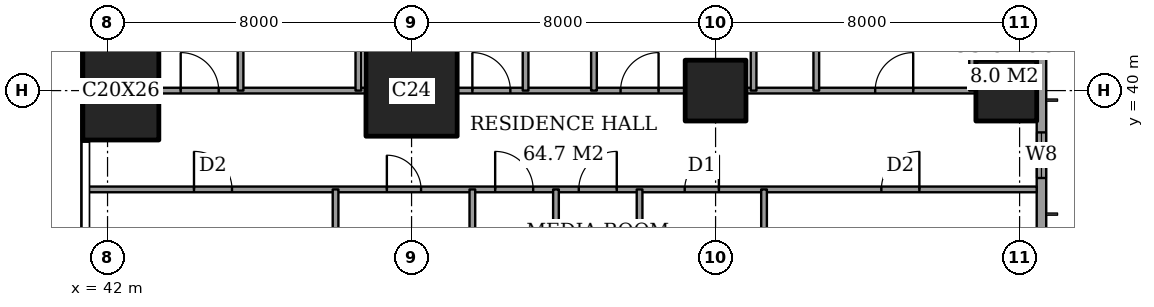
"""IFC4 building model, lengths in metres.
Left out: names, types, materials, properties, quantities, classifications, styles, units other than length and angle.
Written with IfcOpenShell. Run it as: python <this file> out.ifc"""

import sys

from ifc_helpers import new_model, si_unit, direction, frame, frame_2d, origin, origin_2d, place, context, subcontext, project, spatial, rectangle, extrude, element, fill, save


model = new_model("IFC4")
c1 = context("Model", 3, precision=1e-05, world=origin(), true_north=direction((0.0, 1.0)))
c2 = subcontext(c1, "Body", "Model", "MODEL_VIEW")
j1 = project(units=[si_unit("LENGTHUNIT", "METRE"), si_unit("PLANEANGLEUNIT", "RADIAN")], contexts=[c1])
p1 = place(None, origin())
s1 = spatial("IfcSite", under=j1, at=p1, CompositionType="ELEMENT")
p2 = place(p1, origin())
s2 = spatial("IfcBuilding", under=s1, at=p2, CompositionType="ELEMENT")
p3 = place(p2, frame((0.0, 0.0, 237.6)))
s3 = spatial("IfcBuildingStorey", under=s2, at=p3, CompositionType="ELEMENT", Elevation=237.6)
p4 = place(p3, frame((42.35, 40.0, 0.0), z_axis=(0.0, 0.0, 1.0), x_axis=(1.0, 0.0, 0.0)))
e1 = element("IfcColumn", 1, at=p4, inside=s3, PredefinedType="COLUMN", context=c2, shape_type="SweptSolid", body=[
    extrude(rectangle(XDim=2.0, YDim=2.6, at=origin_2d()), origin(), (0.0, 0.0, 1.0), 3.6),
])
p5 = place(p3, frame((50.0, 40.0, 0.0), z_axis=(0.0, 0.0, 1.0), x_axis=(1.0, 0.0, 0.0)))
e2 = element("IfcColumn", 2, at=p5, inside=s3, PredefinedType="COLUMN", context=c2, shape_type="SweptSolid", body=[
    extrude(rectangle(XDim=2.4, YDim=2.4, at=origin_2d()), origin(), (0.0, 0.0, 1.0), 3.6),
])
for number, where, z_axis, x_axis in (
    (3, (58.0, 40.0, 0.0), (0.0, 0.0, 1.0), (1.0, 0.0, 0.0)),
    (4, (65.65, 40.0, 0.0), (0.0, 0.0, 1.0), (1.0, 0.0, 0.0)),
):
    element("IfcColumn", number, at=place(p3, frame(where, z_axis=z_axis, x_axis=x_axis)), inside=s3, PredefinedType="COLUMN", context=c2, shape_type="SweptSolid", body=[
        extrude(rectangle(XDim=1.6, YDim=1.6, at=origin_2d()), origin(), (0.0, 0.0, 1.0), 3.6),
    ])
p6 = place(p3, frame((66.575, 3.175, 0.0), z_axis=(0.0, 0.0, 1.0), x_axis=(0.0, 1.0, 0.0)))
e5 = element("IfcWall", 5, at=p6, inside=s3, PredefinedType="SOLIDWALL", context=c2, shape_type="SweptSolid", body=[
    extrude(rectangle(XDim=41.65, YDim=0.25, at=frame_2d((20.825, 0.0))), origin(), (0.0, 0.0, 1.0), 3.6),
])
p7 = place(p6, frame((0.875, 0.0, 0.6)))
e6 = element("IfcOpeningElement", 6, at=p7, cuts=e5, PredefinedType="OPENING", context=c2, shape_type="SweptSolid", body=[
    extrude(rectangle(XDim=2.4, YDim=2.0, at=frame_2d((1.2, 1.0))), frame((0.0, 0.135, 0.0), z_axis=(0.0, -1.0, 0.0), x_axis=(1.0, 0.0, 0.0)), (0.0, 0.0, 1.0), 0.27),
])
p8 = place(p6, frame((6.225, 0.0, 0.6)))
e7 = element("IfcOpeningElement", 7, at=p8, cuts=e5, PredefinedType="OPENING", context=c2, shape_type="SweptSolid", body=[
    extrude(rectangle(XDim=1.2, YDim=2.0, at=frame_2d((0.6, 1.0))), frame((0.0, 0.135, 0.0), z_axis=(0.0, -1.0, 0.0), x_axis=(1.0, 0.0, 0.0)), (0.0, 0.0, 1.0), 0.27),
])
p9 = place(p6, frame((8.725, 0.0, 0.6)))
e8 = element("IfcOpeningElement", 8, at=p9, cuts=e5, PredefinedType="OPENING", context=c2, shape_type="SweptSolid", body=[
    extrude(rectangle(XDim=2.4, YDim=2.0, at=frame_2d((1.2, 1.0))), frame((0.0, 0.135, 0.0), z_axis=(0.0, -1.0, 0.0), x_axis=(1.0, 0.0, 0.0)), (0.0, 0.0, 1.0), 0.27),
])
p10 = place(p6, frame((15.725, 0.0, 0.6)))
e9 = element("IfcOpeningElement", 9, at=p10, cuts=e5, PredefinedType="OPENING", context=c2, shape_type="SweptSolid", body=[
    extrude(rectangle(XDim=2.4, YDim=2.0, at=frame_2d((1.2, 1.0))), frame((0.0, 0.135, 0.0), z_axis=(0.0, -1.0, 0.0), x_axis=(1.0, 0.0, 0.0)), (0.0, 0.0, 1.0), 0.27),
])
p11 = place(p6, frame((23.525, 0.0, 0.6)))
e10 = element("IfcOpeningElement", 10, at=p11, cuts=e5, PredefinedType="OPENING", context=c2, shape_type="SweptSolid", body=[
    extrude(rectangle(XDim=2.4, YDim=2.0, at=frame_2d((1.2, 1.0))), frame((0.0, 0.135, 0.0), z_axis=(0.0, -1.0, 0.0), x_axis=(1.0, 0.0, 0.0)), (0.0, 0.0, 1.0), 0.27),
])
p12 = place(p6, frame((30.725, 0.0, 0.6)))
e11 = element("IfcOpeningElement", 11, at=p12, cuts=e5, PredefinedType="OPENING", context=c2, shape_type="SweptSolid", body=[
    extrude(rectangle(XDim=2.4, YDim=2.0, at=frame_2d((1.2, 1.0))), frame((0.0, 0.135, 0.0), z_axis=(0.0, -1.0, 0.0), x_axis=(1.0, 0.0, 0.0)), (0.0, 0.0, 1.0), 0.27),
])
p13 = place(p6, frame((34.525, 0.0, 0.6)))
e12 = element("IfcOpeningElement", 12, at=p13, cuts=e5, PredefinedType="OPENING", context=c2, shape_type="SweptSolid", body=[
    extrude(rectangle(XDim=1.2, YDim=2.0, at=frame_2d((0.6, 1.0))), frame((0.0, 0.135, 0.0), z_axis=(0.0, -1.0, 0.0), x_axis=(1.0, 0.0, 0.0)), (0.0, 0.0, 1.0), 0.27),
])
p14 = place(p6, frame((38.375, 0.0, 0.6)))
e13 = element("IfcOpeningElement", 13, at=p14, cuts=e5, PredefinedType="OPENING", context=c2, shape_type="SweptSolid", body=[
    extrude(rectangle(XDim=2.4, YDim=2.0, at=frame_2d((1.2, 1.0))), frame((0.0, 0.135, 0.0), z_axis=(0.0, -1.0, 0.0), x_axis=(1.0, 0.0, 0.0)), (0.0, 0.0, 1.0), 0.27),
])
p15 = place(p3, frame((41.439, 37.4, 0.0), z_axis=(0.0, 0.0, 1.0), x_axis=(1.0, 0.0, 0.0)))
e14 = element("IfcWall", 14, at=p15, inside=s3, PredefinedType="PARTITIONING", context=c2, shape_type="SweptSolid", body=[
    extrude(rectangle(XDim=25.011, YDim=0.15, at=frame_2d((12.505, 0.0))), origin(), (0.0, 0.0, 1.0), 3.35),
])
p16 = place(p15, frame((10.761, 0.0, 0.0)))
e15 = element("IfcOpeningElement", 15, at=p16, cuts=e14, PredefinedType="OPENING", context=c2, shape_type="SweptSolid", body=[
    extrude(rectangle(XDim=1.0, YDim=2.1, at=frame_2d((0.5, 1.05))), frame((0.0, 0.085, 0.0), z_axis=(0.0, -1.0, 0.0), x_axis=(1.0, 0.0, 0.0)), (0.0, 0.0, 1.0), 0.17),
])
p17 = place(p15, frame((20.924, 0.0, 0.0)))
e16 = element("IfcOpeningElement", 16, at=p17, cuts=e14, PredefinedType="OPENING", context=c2, shape_type="SweptSolid", body=[
    extrude(rectangle(XDim=1.0, YDim=2.1, at=frame_2d((0.5, 1.05))), frame((0.0, 0.085, 0.0), z_axis=(0.0, -1.0, 0.0), x_axis=(1.0, 0.0, 0.0)), (0.0, 0.0, 1.0), 0.17),
])
p18 = place(p15, frame((15.749, 0.0, 0.0)))
e17 = element("IfcOpeningElement", 17, at=p18, cuts=e14, PredefinedType="OPENING", context=c2, shape_type="SweptSolid", body=[
    extrude(rectangle(XDim=0.9, YDim=2.1, at=frame_2d((0.45, 1.05))), frame((0.0, 0.085, 0.0), z_axis=(0.0, -1.0, 0.0), x_axis=(1.0, 0.0, 0.0)), (0.0, 0.0, 1.0), 0.17),
])
p19 = place(p15, frame((12.961, 0.0, 0.0)))
e18 = element("IfcOpeningElement", 18, at=p19, cuts=e14, PredefinedType="OPENING", context=c2, shape_type="SweptSolid", body=[
    extrude(rectangle(XDim=1.0, YDim=2.1, at=frame_2d((0.5, 1.05))), frame((0.0, 0.085, 0.0), z_axis=(0.0, -1.0, 0.0), x_axis=(1.0, 0.0, 0.0)), (0.0, 0.0, 1.0), 0.17),
])
p20 = place(p15, frame((7.911, 0.0, 0.0)))
e19 = element("IfcOpeningElement", 19, at=p20, cuts=e14, PredefinedType="OPENING", context=c2, shape_type="SweptSolid", body=[
    extrude(rectangle(XDim=0.9, YDim=2.1, at=frame_2d((0.45, 1.05))), frame((0.0, 0.085, 0.0), z_axis=(0.0, -1.0, 0.0), x_axis=(1.0, 0.0, 0.0)), (0.0, 0.0, 1.0), 0.17),
])
p21 = place(p15, frame((2.836, 0.0, 0.0)))
e20 = element("IfcOpeningElement", 20, at=p21, cuts=e14, PredefinedType="OPENING", context=c2, shape_type="SweptSolid", body=[
    extrude(rectangle(XDim=1.0, YDim=2.1, at=frame_2d((0.5, 1.05))), frame((0.0, 0.085, 0.0), z_axis=(0.0, -1.0, 0.0), x_axis=(1.0, 0.0, 0.0)), (0.0, 0.0, 1.0), 0.17),
])
p22 = place(p3, frame((43.35, 40.0, 0.0), z_axis=(0.0, 0.0, 1.0), x_axis=(1.0, 0.0, 0.0)))
e21 = element("IfcWall", 21, at=p22, inside=s3, PredefinedType="PARTITIONING", context=c2, shape_type="SweptSolid", body=[
    extrude(rectangle(XDim=5.45, YDim=0.15, at=frame_2d((2.725, 0.0))), origin(), (0.0, 0.0, 1.0), 3.35),
])
p23 = place(p22, frame((0.575, 0.0, 0.0)))
e22 = element("IfcOpeningElement", 22, at=p23, cuts=e21, PredefinedType="OPENING", context=c2, shape_type="SweptSolid", body=[
    extrude(rectangle(XDim=1.0, YDim=2.1, at=frame_2d((0.5, 1.05))), frame((0.0, 0.085, 0.0), z_axis=(0.0, -1.0, 0.0), x_axis=(1.0, 0.0, 0.0)), (0.0, 0.0, 1.0), 0.17),
])
p24 = place(p3, frame((51.2, 40.0, 0.0), z_axis=(0.0, 0.0, 1.0), x_axis=(1.0, 0.0, 0.0)))
e23 = element("IfcWall", 23, at=p24, inside=s3, PredefinedType="PARTITIONING", context=c2, shape_type="SweptSolid", body=[
    extrude(rectangle(XDim=6.0, YDim=0.15, at=frame_2d((3.0, 0.0))), origin(), (0.0, 0.0, 1.0), 3.35),
])
p25 = place(p24, frame((4.3, 0.0, 0.0)))
e24 = element("IfcOpeningElement", 24, at=p25, cuts=e23, PredefinedType="OPENING", context=c2, shape_type="SweptSolid", body=[
    extrude(rectangle(XDim=1.0, YDim=2.1, at=frame_2d((0.5, 1.05))), frame((0.0, 0.085, 0.0), z_axis=(0.0, -1.0, 0.0), x_axis=(1.0, 0.0, 0.0)), (0.0, 0.0, 1.0), 0.17),
])
p26 = place(p24, frame((0.4, 0.0, 0.0)))
e25 = element("IfcOpeningElement", 25, at=p26, cuts=e23, PredefinedType="OPENING", context=c2, shape_type="SweptSolid", body=[
    extrude(rectangle(XDim=1.0, YDim=2.1, at=frame_2d((0.5, 1.05))), frame((0.0, 0.085, 0.0), z_axis=(0.0, -1.0, 0.0), x_axis=(1.0, 0.0, 0.0)), (0.0, 0.0, 1.0), 0.17),
])
p27 = place(p3, frame((58.8, 40.0, 0.0), z_axis=(0.0, 0.0, 1.0), x_axis=(1.0, 0.0, 0.0)))
e26 = element("IfcWall", 26, at=p27, inside=s3, PredefinedType="PARTITIONING", context=c2, shape_type="SweptSolid", body=[
    extrude(rectangle(XDim=6.05, YDim=0.15, at=frame_2d((3.025, 0.0))), origin(), (0.0, 0.0, 1.0), 3.35),
])
p28 = place(p27, frame((3.4, 0.0, 0.0)))
e27 = element("IfcOpeningElement", 27, at=p28, cuts=e26, PredefinedType="OPENING", context=c2, shape_type="SweptSolid", body=[
    extrude(rectangle(XDim=1.0, YDim=2.1, at=frame_2d((0.5, 1.05))), frame((0.0, 0.085, 0.0), z_axis=(0.0, -1.0, 0.0), x_axis=(1.0, 0.0, 0.0)), (0.0, 0.0, 1.0), 0.17),
])
p29 = place(p3, frame((45.5, 40.0, 0.0), z_axis=(0.0, 0.0, 1.0), x_axis=(0.0, 1.0, 0.0)))
e28 = element("IfcWall", 28, at=p29, inside=s3, PredefinedType="PARTITIONING", context=c2, shape_type="SweptSolid", body=[
    extrude(rectangle(XDim=8.45, YDim=0.15, at=frame_2d((4.225, 0.0))), origin(), (0.0, 0.0, 1.0), 3.35),
])
p30 = place(p3, frame((48.0, 28.0, 0.0), z_axis=(0.0, 0.0, 1.0), x_axis=(0.0, 1.0, 0.0)))
e29 = element("IfcWall", 29, at=p30, inside=s3, PredefinedType="PARTITIONING", context=c2, shape_type="SweptSolid", body=[
    extrude(rectangle(XDim=9.4, YDim=0.15, at=frame_2d((4.7, 0.0))), origin(), (0.0, 0.0, 1.0), 3.35),
])
p31 = place(p30, frame((0.5, 0.0, 0.0)))
e30 = element("IfcOpeningElement", 30, at=p31, cuts=e29, PredefinedType="OPENING", context=c2, shape_type="SweptSolid", body=[
    extrude(rectangle(XDim=1.0, YDim=2.1, at=frame_2d((0.5, 1.05))), frame((0.0, 0.085, 0.0), z_axis=(0.0, -1.0, 0.0), x_axis=(1.0, 0.0, 0.0)), (0.0, 0.0, 1.0), 0.17),
])
p32 = place(p3, frame((48.6, 40.0, 0.0), z_axis=(0.0, 0.0, 1.0), x_axis=(0.0, 1.0, 0.0)))
e31 = element("IfcWall", 31, at=p32, inside=s3, PredefinedType="PARTITIONING", context=c2, shape_type="SweptSolid", body=[
    extrude(rectangle(XDim=8.45, YDim=0.15, at=frame_2d((4.225, 0.0))), origin(), (0.0, 0.0, 1.0), 3.35),
])
p33 = place(p32, frame((3.775, 0.0, 0.0)))
e32 = element("IfcOpeningElement", 32, at=p33, cuts=e31, PredefinedType="OPENING", context=c2, shape_type="SweptSolid", body=[
    extrude(rectangle(XDim=0.9, YDim=2.1, at=frame_2d((0.45, 1.05))), frame((0.0, 0.085, 0.0), z_axis=(0.0, -1.0, 0.0), x_axis=(1.0, 0.0, 0.0)), (0.0, 0.0, 1.0), 0.17),
])
p34 = place(p3, frame((51.6, 30.0, 0.0), z_axis=(0.0, 0.0, 1.0), x_axis=(0.0, 1.0, 0.0)))
e33 = element("IfcWall", 33, at=p34, inside=s3, PredefinedType="PARTITIONING", context=c2, shape_type="SweptSolid", body=[
    extrude(rectangle(XDim=7.4, YDim=0.15, at=frame_2d((3.7, 0.0))), origin(), (0.0, 0.0, 1.0), 3.35),
])
p35 = place(p3, frame((53.0, 40.0, 0.0), z_axis=(0.0, 0.0, 1.0), x_axis=(0.0, 1.0, 0.0)))
e34 = element("IfcWall", 34, at=p35, inside=s3, PredefinedType="PARTITIONING", context=c2, shape_type="SweptSolid", body=[
    extrude(rectangle(XDim=8.45, YDim=0.15, at=frame_2d((4.225, 0.0))), origin(), (0.0, 0.0, 1.0), 3.35),
])
p36 = place(p3, frame((53.8, 30.0, 0.0), z_axis=(0.0, 0.0, 1.0), x_axis=(0.0, 1.0, 0.0)))
e35 = element("IfcWall", 35, at=p36, inside=s3, PredefinedType="PARTITIONING", context=c2, shape_type="SweptSolid", body=[
    extrude(rectangle(XDim=7.4, YDim=0.15, at=frame_2d((3.7, 0.0))), origin(), (0.0, 0.0, 1.0), 3.35),
])
p37 = place(p3, frame((54.8, 40.0, 0.0), z_axis=(0.0, 0.0, 1.0), x_axis=(0.0, 1.0, 0.0)))
e36 = element("IfcWall", 36, at=p37, inside=s3, PredefinedType="PARTITIONING", context=c2, shape_type="SweptSolid", body=[
    extrude(rectangle(XDim=8.45, YDim=0.15, at=frame_2d((4.225, 0.0))), origin(), (0.0, 0.0, 1.0), 3.35),
])
p38 = place(p37, frame((3.775, 0.0, 0.0)))
e37 = element("IfcOpeningElement", 37, at=p38, cuts=e36, PredefinedType="OPENING", context=c2, shape_type="SweptSolid", body=[
    extrude(rectangle(XDim=0.9, YDim=2.1, at=frame_2d((0.45, 1.05))), frame((0.0, 0.085, 0.0), z_axis=(0.0, -1.0, 0.0), x_axis=(1.0, 0.0, 0.0)), (0.0, 0.0, 1.0), 0.17),
])
p39 = place(p3, frame((56.0, 28.0, 0.0), z_axis=(0.0, 0.0, 1.0), x_axis=(0.0, 1.0, 0.0)))
e38 = element("IfcWall", 38, at=p39, inside=s3, PredefinedType="PARTITIONING", context=c2, shape_type="SweptSolid", body=[
    extrude(rectangle(XDim=9.4, YDim=0.15, at=frame_2d((4.7, 0.0))), origin(), (0.0, 0.0, 1.0), 3.35),
])
p40 = place(p39, frame((0.5, 0.0, 0.0)))
e39 = element("IfcOpeningElement", 39, at=p40, cuts=e38, PredefinedType="OPENING", context=c2, shape_type="SweptSolid", body=[
    extrude(rectangle(XDim=1.0, YDim=2.1, at=frame_2d((0.5, 1.05))), frame((0.0, 0.085, 0.0), z_axis=(0.0, -1.0, 0.0), x_axis=(1.0, 0.0, 0.0)), (0.0, 0.0, 1.0), 0.17),
])
p41 = place(p3, frame((59.0, 40.0, 0.0), z_axis=(0.0, 0.0, 1.0), x_axis=(0.0, 1.0, 0.0)))
e40 = element("IfcWall", 40, at=p41, inside=s3, PredefinedType="PARTITIONING", context=c2, shape_type="SweptSolid", body=[
    extrude(rectangle(XDim=8.45, YDim=0.15, at=frame_2d((4.225, 0.0))), origin(), (0.0, 0.0, 1.0), 3.35),
])
p42 = place(p3, frame((59.275, 33.2, 0.0), z_axis=(0.0, 0.0, 1.0), x_axis=(0.0, 1.0, 0.0)))
e41 = element("IfcWall", 41, at=p42, inside=s3, PredefinedType="PARTITIONING", context=c2, shape_type="SweptSolid", body=[
    extrude(rectangle(XDim=4.2, YDim=0.15, at=frame_2d((2.1, 0.0))), origin(), (0.0, 0.0, 1.0), 3.35),
])
p43 = place(p3, frame((60.65, 40.0, 0.0), z_axis=(0.0, 0.0, 1.0), x_axis=(0.0, 1.0, 0.0)))
e42 = element("IfcWall", 42, at=p43, inside=s3, PredefinedType="PARTITIONING", context=c2, shape_type="SweptSolid", body=[
    extrude(rectangle(XDim=8.45, YDim=0.15, at=frame_2d((4.225, 0.0))), origin(), (0.0, 0.0, 1.0), 3.35),
])
p44 = place(p43, frame((3.775, 0.0, 0.0)))
e43 = element("IfcOpeningElement", 43, at=p44, cuts=e42, PredefinedType="OPENING", context=c2, shape_type="SweptSolid", body=[
    extrude(rectangle(XDim=0.9, YDim=2.1, at=frame_2d((0.45, 1.05))), frame((0.0, 0.085, 0.0), z_axis=(0.0, -1.0, 0.0), x_axis=(1.0, 0.0, 0.0)), (0.0, 0.0, 1.0), 0.17),
])
p45 = place(p3, frame((64.75, 40.0, 0.0), z_axis=(0.0, 0.0, 1.0), x_axis=(0.0, 1.0, 0.0)))
e44 = element("IfcWall", 44, at=p45, inside=s3, PredefinedType="PARTITIONING", context=c2, shape_type="SweptSolid", body=[
    extrude(rectangle(XDim=4.7, YDim=0.15, at=frame_2d((2.35, 0.0))), origin(), (0.0, 0.0, 1.0), 3.35),
])
p46 = place(p45, frame((1.9, 0.0, 0.0)))
e45 = element("IfcOpeningElement", 45, at=p46, cuts=e44, PredefinedType="OPENING", context=c2, shape_type="SweptSolid", body=[
    extrude(rectangle(XDim=0.9, YDim=2.1, at=frame_2d((0.45, 1.05))), frame((0.0, 0.085, 0.0), z_axis=(0.0, -1.0, 0.0), x_axis=(1.0, 0.0, 0.0)), (0.0, 0.0, 1.0), 0.17),
])
p47 = place(p13, origin())
e46 = element("IfcWindow", 46, at=p47, inside=s3, PartitioningType="SINGLE_PANEL", PredefinedType="WINDOW", context=c2, shape_type="SweptSolid", body=[
    extrude(rectangle(XDim=1.2, YDim=2.0, at=frame_2d((0.6, 1.0))), frame((0.0, 0.03, 0.0), z_axis=(0.0, -1.0, 0.0), x_axis=(1.0, 0.0, 0.0)), (0.0, 0.0, 1.0), 0.06),
])
fill(e12, e46)
p48 = place(p28, origin())
e47 = element("IfcDoor", 47, at=p48, inside=s3, OperationType="SINGLE_SWING_LEFT", PredefinedType="DOOR", context=c2, shape_type="SweptSolid", body=[
    extrude(rectangle(XDim=1.0, YDim=2.1, at=frame_2d((0.5, 1.05))), frame((0.0, 0.025, 0.0), z_axis=(0.0, -1.0, 0.0), x_axis=(1.0, 0.0, 0.0)), (0.0, 0.0, 1.0), 0.05),
])
fill(e27, e47)
p49 = place(p25, origin())
e48 = element("IfcDoor", 48, at=p49, inside=s3, OperationType="SINGLE_SWING_LEFT", PredefinedType="DOOR", context=c2, shape_type="SweptSolid", body=[
    extrude(rectangle(XDim=1.0, YDim=2.1, at=frame_2d((0.5, 1.05))), frame((0.0, 0.025, 0.0), z_axis=(0.0, -1.0, 0.0), x_axis=(1.0, 0.0, 0.0)), (0.0, 0.0, 1.0), 0.05),
])
fill(e24, e48)
p50 = place(p26, origin())
e49 = element("IfcDoor", 49, at=p50, inside=s3, OperationType="SINGLE_SWING_RIGHT", PredefinedType="DOOR", context=c2, shape_type="SweptSolid", body=[
    extrude(rectangle(XDim=1.0, YDim=2.1, at=frame_2d((0.5, 1.05))), frame((0.0, 0.025, 0.0), z_axis=(0.0, -1.0, 0.0), x_axis=(1.0, 0.0, 0.0)), (0.0, 0.0, 1.0), 0.05),
])
fill(e25, e49)
p51 = place(p23, origin())
e50 = element("IfcDoor", 50, at=p51, inside=s3, OperationType="SINGLE_SWING_RIGHT", PredefinedType="DOOR", context=c2, shape_type="SweptSolid", body=[
    extrude(rectangle(XDim=1.0, YDim=2.1, at=frame_2d((0.5, 1.05))), frame((0.0, 0.025, 0.0), z_axis=(0.0, -1.0, 0.0), x_axis=(1.0, 0.0, 0.0)), (0.0, 0.0, 1.0), 0.05),
])
fill(e22, e50)
p52 = place(p16, origin())
e51 = element("IfcDoor", 51, at=p52, inside=s3, OperationType="SINGLE_SWING_RIGHT", PredefinedType="DOOR", context=c2, shape_type="SweptSolid", body=[
    extrude(rectangle(XDim=1.0, YDim=2.1, at=frame_2d((0.5, 1.05))), frame((0.0, 0.025, 0.0), z_axis=(0.0, -1.0, 0.0), x_axis=(1.0, 0.0, 0.0)), (0.0, 0.0, 1.0), 0.05),
])
fill(e15, e51)
p53 = place(p17, origin())
e52 = element("IfcDoor", 52, at=p53, inside=s3, OperationType="SINGLE_SWING_LEFT", PredefinedType="DOOR", context=c2, shape_type="SweptSolid", body=[
    extrude(rectangle(XDim=1.0, YDim=2.1, at=frame_2d((0.5, 1.05))), frame((0.0, 0.025, 0.0), z_axis=(0.0, -1.0, 0.0), x_axis=(1.0, 0.0, 0.0)), (0.0, 0.0, 1.0), 0.05),
])
fill(e16, e52)
p54 = place(p18, origin())
e53 = element("IfcDoor", 53, at=p54, inside=s3, OperationType="SINGLE_SWING_LEFT", PredefinedType="DOOR", context=c2, shape_type="SweptSolid", body=[
    extrude(rectangle(XDim=0.9, YDim=2.1, at=frame_2d((0.45, 1.05))), frame((0.0, 0.025, 0.0), z_axis=(0.0, -1.0, 0.0), x_axis=(1.0, 0.0, 0.0)), (0.0, 0.0, 1.0), 0.05),
])
fill(e17, e53)
p55 = place(p19, origin())
e54 = element("IfcDoor", 54, at=p55, inside=s3, OperationType="SINGLE_SWING_LEFT", PredefinedType="DOOR", context=c2, shape_type="SweptSolid", body=[
    extrude(rectangle(XDim=1.0, YDim=2.1, at=frame_2d((0.5, 1.05))), frame((0.0, 0.025, 0.0), z_axis=(0.0, -1.0, 0.0), x_axis=(1.0, 0.0, 0.0)), (0.0, 0.0, 1.0), 0.05),
])
fill(e18, e54)
p56 = place(p20, origin())
e55 = element("IfcDoor", 55, at=p56, inside=s3, OperationType="SINGLE_SWING_RIGHT", PredefinedType="DOOR", context=c2, shape_type="SweptSolid", body=[
    extrude(rectangle(XDim=0.9, YDim=2.1, at=frame_2d((0.45, 1.05))), frame((0.0, 0.025, 0.0), z_axis=(0.0, -1.0, 0.0), x_axis=(1.0, 0.0, 0.0)), (0.0, 0.0, 1.0), 0.05),
])
fill(e19, e55)
p57 = place(p21, origin())
e56 = element("IfcDoor", 56, at=p57, inside=s3, OperationType="SINGLE_SWING_RIGHT", PredefinedType="DOOR", context=c2, shape_type="SweptSolid", body=[
    extrude(rectangle(XDim=1.0, YDim=2.1, at=frame_2d((0.5, 1.05))), frame((0.0, 0.025, 0.0), z_axis=(0.0, -1.0, 0.0), x_axis=(1.0, 0.0, 0.0)), (0.0, 0.0, 1.0), 0.05),
])
fill(e20, e56)
save(model, sys.argv[1])
